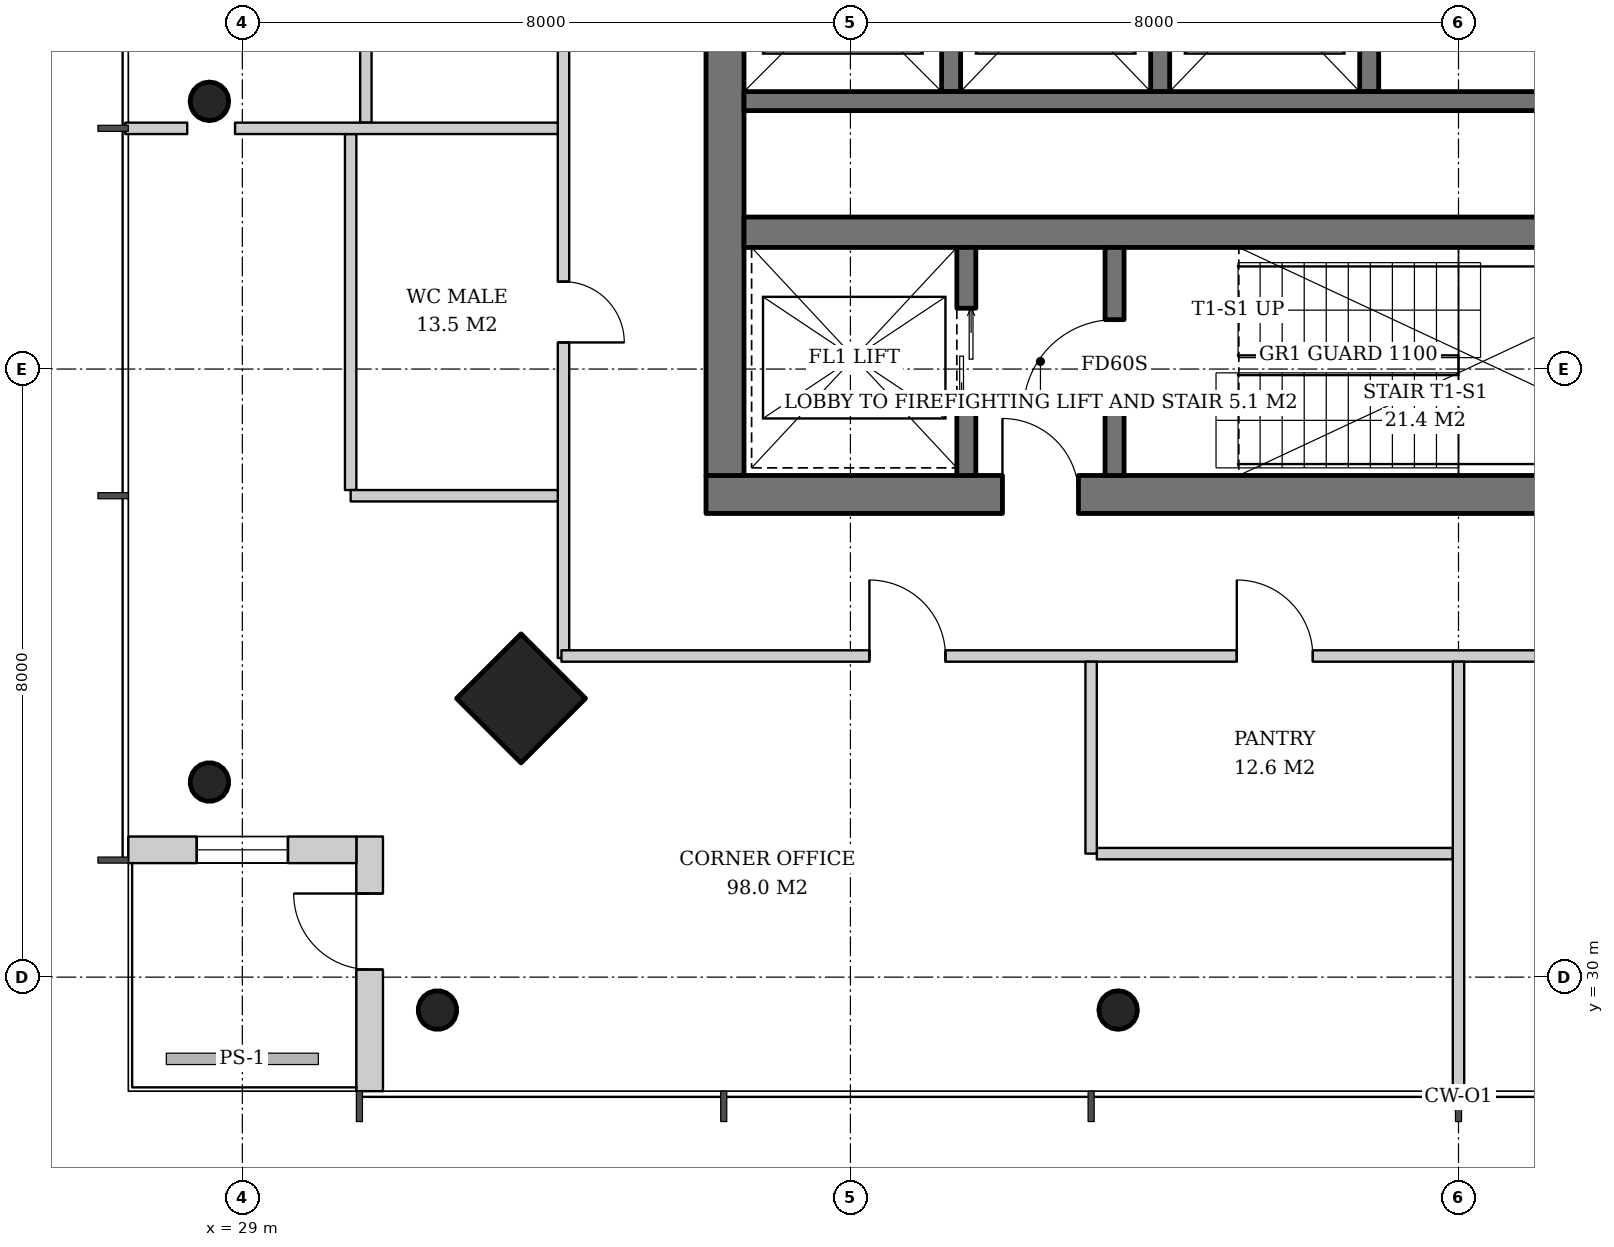
"""IFC4 building model, lengths in metres.
Left out: names, types, materials, properties, quantities, classifications, styles, units other than length and angle.
Written with IfcOpenShell. Run it as: python <this file> out.ifc"""

import sys

from ifc_helpers import new_model, si_unit, direction, frame, frame_2d, origin, origin_2d, place, context, subcontext, project, spatial, rectangle, hollow_circle, extrude, element, fill, save


model = new_model("IFC4")
c1 = context("Model", 3, precision=1e-05, world=origin(), true_north=direction((0.0, 1.0)))
c2 = subcontext(c1, "Body", "Model", "MODEL_VIEW")
j1 = project(units=[si_unit("LENGTHUNIT", "METRE"), si_unit("PLANEANGLEUNIT", "RADIAN")], contexts=[c1])
p1 = place(None, origin())
s1 = spatial("IfcSite", under=j1, at=p1, CompositionType="ELEMENT")
p2 = place(p1, origin())
s2 = spatial("IfcBuilding", under=s1, at=p2, CompositionType="ELEMENT")
p3 = place(p2, frame((0.0, 0.0, 256.6)))
s3 = spatial("IfcBuildingStorey", under=s2, at=p3, CompositionType="ELEMENT", Elevation=256.6)
p4 = place(p3, frame((32.629, 33.629, 0.0), z_axis=(0.031900153262, 0.031900153262, 0.998981861919), x_axis=(-0.707106781187, 0.707106781187, 0.0)))
e1 = element("IfcColumn", 1, at=p4, inside=s3, PredefinedType="COLUMN", context=c2, shape_type="SweptSolid", body=[
    extrude(rectangle(XDim=1.2, YDim=1.2, at=origin_2d()), origin(), (0.0, 0.0, 1.0), 3.804),
])
p5 = place(p3, frame((28.529, 32.529, 0.0), z_axis=(0.031900153262, 0.031900153262, 0.998981861919), x_axis=(-0.707106781187, 0.707106781187, 0.0)))
e2 = element("IfcColumn", 2, at=p5, inside=s3, PredefinedType="COLUMN", context=c2, shape_type="SweptSolid", body=[
    extrude(hollow_circle(Radius=0.254, WallThickness=0.02, at=origin_2d()), origin(), (0.0, 0.0, 1.0), 3.804),
])
p6 = place(p3, frame((28.529, 41.51, 0.0), z_axis=(0.031914583439, 0.010659599298, 0.999433755837), x_axis=(-0.316800238982, 0.948492281772, 0.0)))
e3 = element("IfcColumn", 3, at=p6, inside=s3, PredefinedType="COLUMN", context=c2, shape_type="SweptSolid", body=[
    extrude(hollow_circle(Radius=0.254, WallThickness=0.02, at=origin_2d()), origin(), (0.0, 0.0, 1.0), 3.802),
])
p7 = place(p3, frame((31.529, 29.529, 0.0), z_axis=(0.031900153262, 0.031900153262, 0.998981861919), x_axis=(-0.707106781187, 0.707106781187, 0.0)))
e4 = element("IfcColumn", 4, at=p7, inside=s3, PredefinedType="COLUMN", context=c2, shape_type="SweptSolid", body=[
    extrude(hollow_circle(Radius=0.254, WallThickness=0.02, at=origin_2d()), origin(), (0.0, 0.0, 1.0), 3.804),
])
p8 = place(p3, frame((40.51, 29.529, 0.0), z_axis=(0.010659599298, 0.031914583439, 0.999433755837), x_axis=(-0.948492281772, 0.316800238982, 0.0)))
e5 = element("IfcColumn", 5, at=p8, inside=s3, PredefinedType="COLUMN", context=c2, shape_type="SweptSolid", body=[
    extrude(hollow_circle(Radius=0.254, WallThickness=0.02, at=origin_2d()), origin(), (0.0, 0.0, 1.0), 3.802),
])
p9 = place(p3, frame((35.1, 36.35, 0.0), z_axis=(0.0, 0.0, 1.0), x_axis=(1.0, 0.0, 0.0)))
e6 = element("IfcWall", 6, at=p9, inside=s3, PredefinedType="SHEAR", context=c2, shape_type="SweptSolid", body=[
    extrude(rectangle(XDim=19.8, YDim=0.5, at=frame_2d((9.9, 0.0))), origin(), (0.0, 0.0, 1.0), 3.8),
])
p10 = place(p9, frame((3.9, 0.0, 0.0)))
e7 = element("IfcOpeningElement", 7, at=p10, cuts=e6, PredefinedType="OPENING", context=c2, shape_type="SweptSolid", body=[
    extrude(rectangle(XDim=1.0, YDim=2.1, at=frame_2d((0.5, 1.05))), frame((0.0, 0.26, 0.0), z_axis=(0.0, -1.0, 0.0), x_axis=(1.0, 0.0, 0.0)), (0.0, 0.0, 1.0), 0.52),
])
p11 = place(p9, frame((15.35, 0.0, 0.0)))
e8 = element("IfcOpeningElement", 8, at=p11, cuts=e6, PredefinedType="OPENING", context=c2, shape_type="SweptSolid", body=[
    extrude(rectangle(XDim=1.0, YDim=2.1, at=frame_2d((0.5, 1.05))), frame((0.0, 0.26, 0.0), z_axis=(0.0, -1.0, 0.0), x_axis=(1.0, 0.0, 0.0)), (0.0, 0.0, 1.0), 0.52),
])
p12 = place(p3, frame((35.35, 36.6, 0.0), z_axis=(0.0, 0.0, 1.0), x_axis=(0.0, 1.0, 0.0)))
e9 = element("IfcWall", 9, at=p12, inside=s3, PredefinedType="SHEAR", context=c2, shape_type="SweptSolid", body=[
    extrude(rectangle(XDim=18.8, YDim=0.5, at=frame_2d((9.4, 0.0))), origin(), (0.0, 0.0, 1.0), 3.8),
])
p13 = place(p12, frame((8.5, 0.0, 0.0)))
e10 = element("IfcOpeningElement", 10, at=p13, cuts=e9, PredefinedType="OPENING", context=c2, shape_type="SweptSolid", body=[
    extrude(rectangle(XDim=1.8, YDim=2.4, at=frame_2d((0.9, 1.2))), frame((0.0, 0.26, 0.0), z_axis=(0.0, -1.0, 0.0), x_axis=(1.0, 0.0, 0.0)), (0.0, 0.0, 1.0), 0.52),
])
p14 = place(p3, frame((35.6, 39.8, 0.0), z_axis=(0.0, 0.0, 1.0), x_axis=(1.0, 0.0, 0.0)))
e11 = element("IfcWall", 11, at=p14, inside=s3, PredefinedType="SHEAR", context=c2, shape_type="SweptSolid", body=[
    extrude(rectangle(XDim=18.8, YDim=0.4, at=frame_2d((9.4, 0.0))), origin(), (0.0, 0.0, 1.0), 3.8),
])
p15 = place(p3, frame((30.675, 28.5, 0.0), z_axis=(0.0, 0.0, 1.0), x_axis=(0.0, 1.0, 0.0)))
e12 = element("IfcWall", 12, at=p15, inside=s3, PredefinedType="SOLIDWALL", context=c2, shape_type="SweptSolid", body=[
    extrude(rectangle(XDim=3.35, YDim=0.35, at=frame_2d((1.675, 0.0))), origin(), (0.0, 0.0, 1.0), 3.62),
])
p16 = place(p15, frame((1.6, 0.0, 0.0)))
e13 = element("IfcOpeningElement", 13, at=p16, cuts=e12, PredefinedType="OPENING", context=c2, shape_type="SweptSolid", body=[
    extrude(rectangle(XDim=1.0, YDim=2.4, at=frame_2d((0.5, 1.2))), frame((0.0, 0.185, 0.0), z_axis=(0.0, -1.0, 0.0), x_axis=(1.0, 0.0, 0.0)), (0.0, 0.0, 1.0), 0.37),
])
p17 = place(p3, frame((30.5, 31.675, 0.0), z_axis=(0.0, 0.0, 1.0), x_axis=(-1.0, 0.0, 0.0)))
e14 = element("IfcWall", 14, at=p17, inside=s3, PredefinedType="SOLIDWALL", context=c2, shape_type="SweptSolid", body=[
    extrude(rectangle(XDim=3.0, YDim=0.35, at=frame_2d((1.5, 0.0))), origin(), (0.0, 0.0, 1.0), 3.62),
])
p18 = place(p17, frame((0.9, 0.0, 0.6)))
e15 = element("IfcOpeningElement", 15, at=p18, cuts=e14, PredefinedType="OPENING", context=c2, shape_type="SweptSolid", body=[
    extrude(rectangle(XDim=1.2, YDim=2.55, at=frame_2d((0.6, 1.275))), frame((0.0, 0.185, 0.0), z_axis=(0.0, -1.0, 0.0), x_axis=(1.0, 0.0, 0.0)), (0.0, 0.0, 1.0), 0.37),
])
p19 = place(p3, frame((38.525, 36.6, 0.0), z_axis=(0.0, 0.0, 1.0), x_axis=(0.0, 1.0, 0.0)))
e16 = element("IfcWall", 16, at=p19, inside=s3, PredefinedType="SHEAR", context=c2, shape_type="SweptSolid", body=[
    extrude(rectangle(XDim=3.0, YDim=0.25, at=frame_2d((1.5, 0.0))), origin(), (0.0, 0.0, 1.0), 3.8),
])
p20 = place(p19, frame((0.9, 0.0, 0.0)))
e17 = element("IfcOpeningElement", 17, at=p20, cuts=e16, PredefinedType="OPENING", context=c2, shape_type="SweptSolid", body=[
    extrude(rectangle(XDim=1.3, YDim=2.2, at=frame_2d((0.65, 1.1))), frame((0.0, 0.135, 0.0), z_axis=(0.0, -1.0, 0.0), x_axis=(1.0, 0.0, 0.0)), (0.0, 0.0, 1.0), 0.27),
])
p21 = place(p3, frame((40.475, 36.6, 0.0), z_axis=(0.0, 0.0, 1.0), x_axis=(0.0, 1.0, 0.0)))
e18 = element("IfcWall", 18, at=p21, inside=s3, PredefinedType="SHEAR", context=c2, shape_type="SweptSolid", body=[
    extrude(rectangle(XDim=3.0, YDim=0.25, at=frame_2d((1.5, 0.0))), origin(), (0.0, 0.0, 1.0), 3.8),
])
p22 = place(p21, frame((0.85, 0.0, 0.0)))
e19 = element("IfcOpeningElement", 19, at=p22, cuts=e18, PredefinedType="OPENING", context=c2, shape_type="SweptSolid", body=[
    extrude(rectangle(XDim=1.2, YDim=2.1, at=frame_2d((0.6, 1.05))), frame((0.0, 0.135, 0.0), z_axis=(0.0, -1.0, 0.0), x_axis=(1.0, 0.0, 0.0)), (0.0, 0.0, 1.0), 0.27),
])
for number, where, z_axis, x_axis in (
    (20, (38.325, 44.25, 0.0), (0.0, 0.0, 1.0), (0.0, -1.0, 0.0)),
    (21, (41.075, 44.25, 0.0), (0.0, 0.0, 1.0), (0.0, -1.0, 0.0)),
    (22, (43.825, 44.25, 0.0), (0.0, 0.0, 1.0), (0.0, -1.0, 0.0)),
):
    element("IfcWall", number, at=place(p3, frame(where, z_axis=z_axis, x_axis=x_axis)), inside=s3, PredefinedType="SHEAR", context=c2, shape_type="SweptSolid", body=[
        extrude(rectangle(XDim=2.6, YDim=0.25, at=frame_2d((1.3, 0.0))), origin(), (0.0, 0.0, 1.0), 3.8),
    ])
p23 = place(p3, frame((35.6, 41.525, 0.0), z_axis=(0.0, 0.0, 1.0), x_axis=(1.0, 0.0, 0.0)))
e23 = element("IfcWall", 23, at=p23, inside=s3, PredefinedType="SHEAR", context=c2, shape_type="SweptSolid", body=[
    extrude(rectangle(XDim=11.1, YDim=0.25, at=frame_2d((5.55, 0.0))), origin(), (0.0, 0.0, 1.0), 3.8),
])
p24 = place(p3, frame((30.625, 45.925, 0.0), z_axis=(0.0, 0.0, 1.0), x_axis=(0.0, -1.0, 0.0)))
e24 = element("IfcWall", 24, at=p24, inside=s3, PredefinedType="PARTITIONING", context=c2, shape_type="SweptSolid", body=[
    extrude(rectangle(XDim=4.683, YDim=0.15, at=frame_2d((2.342, 0.0))), origin(), (0.0, 0.0, 1.0), 3.12),
])
p25 = place(p3, frame((30.425, 41.092, 0.0), z_axis=(0.0, 0.0, 1.0), x_axis=(0.0, -1.0, 0.0)))
e25 = element("IfcWall", 25, at=p25, inside=s3, PredefinedType="PARTITIONING", context=c2, shape_type="SweptSolid", body=[
    extrude(rectangle(XDim=4.683, YDim=0.15, at=frame_2d((2.342, 0.0))), origin(), (0.0, 0.0, 1.0), 3.12),
])
p26 = place(p3, frame((33.225, 57.802, 0.0), z_axis=(0.0, 0.0, 1.0), x_axis=(0.0, -1.0, 0.0)))
e26 = element("IfcWall", 26, at=p26, inside=s3, PredefinedType="PARTITIONING", context=c2, shape_type="SweptSolid", body=[
    extrude(rectangle(XDim=23.603, YDim=0.15, at=frame_2d((11.802, 0.0))), origin(), (0.0, 0.0, 1.0), 3.02),
])
p27 = place(p26, frame((4.052, 0.0, 0.0)))
e27 = element("IfcOpeningElement", 27, at=p27, cuts=e26, PredefinedType="OPENING", context=c2, shape_type="SweptSolid", body=[
    extrude(rectangle(XDim=1.0, YDim=2.1, at=frame_2d((0.5, 1.05))), frame((0.0, 0.085, 0.0), z_axis=(0.0, -1.0, 0.0), x_axis=(1.0, 0.0, 0.0)), (0.0, 0.0, 1.0), 0.17),
])
p28 = place(p26, frame((8.985, 0.0, 0.0)))
e28 = element("IfcOpeningElement", 28, at=p28, cuts=e26, PredefinedType="OPENING", context=c2, shape_type="SweptSolid", body=[
    extrude(rectangle(XDim=0.8, YDim=2.1, at=frame_2d((0.4, 1.05))), frame((0.0, 0.085, 0.0), z_axis=(0.0, -1.0, 0.0), x_axis=(1.0, 0.0, 0.0)), (0.0, 0.0, 1.0), 0.17),
])
p29 = place(p26, frame((13.718, 0.0, 0.0)))
e29 = element("IfcOpeningElement", 29, at=p29, cuts=e26, PredefinedType="OPENING", context=c2, shape_type="SweptSolid", body=[
    extrude(rectangle(XDim=1.0, YDim=2.1, at=frame_2d((0.5, 1.05))), frame((0.0, 0.085, 0.0), z_axis=(0.0, -1.0, 0.0), x_axis=(1.0, 0.0, 0.0)), (0.0, 0.0, 1.0), 0.17),
])
p30 = place(p26, frame((18.651, 0.0, 0.0)))
e30 = element("IfcOpeningElement", 30, at=p30, cuts=e26, PredefinedType="OPENING", context=c2, shape_type="SweptSolid", body=[
    extrude(rectangle(XDim=0.8, YDim=2.1, at=frame_2d((0.4, 1.05))), frame((0.0, 0.085, 0.0), z_axis=(0.0, -1.0, 0.0), x_axis=(1.0, 0.0, 0.0)), (0.0, 0.0, 1.0), 0.17),
])
p31 = place(p3, frame((33.15, 41.167, 0.0), z_axis=(0.0, 0.0, 1.0), x_axis=(-1.0, 0.0, 0.0)))
e31 = element("IfcWall", 31, at=p31, inside=s3, PredefinedType="PARTITIONING", context=c2, shape_type="SweptSolid", body=[
    extrude(rectangle(XDim=4.246, YDim=0.15, at=frame_2d((2.123, 0.0))), origin(), (0.0, 0.0, 1.0), 3.62),
])
p32 = place(p3, frame((28.275, 41.167, 0.0), z_axis=(0.0, 0.0, 1.0), x_axis=(-1.0, 0.0, 0.0)))
e32 = element("IfcWall", 32, at=p32, inside=s3, PredefinedType="PARTITIONING", context=c2, shape_type="SweptSolid", body=[
    extrude(rectangle(XDim=0.815, YDim=0.15, at=frame_2d((0.407, 0.0))), origin(), (0.0, 0.0, 1.0), 3.62),
])
p33 = place(p3, frame((33.15, 36.333, 0.0), z_axis=(0.0, 0.0, 1.0), x_axis=(-1.0, 0.0, 0.0)))
e33 = element("IfcWall", 33, at=p33, inside=s3, PredefinedType="PARTITIONING", context=c2, shape_type="SweptSolid", body=[
    extrude(rectangle(XDim=2.725, YDim=0.15, at=frame_2d((1.362, 0.0))), origin(), (0.0, 0.0, 1.0), 3.62),
])
p34 = place(p3, frame((40.242, 31.625, 0.0), z_axis=(0.0, 0.0, 1.0), x_axis=(1.0, 0.0, 0.0)))
e34 = element("IfcWall", 34, at=p34, inside=s3, PredefinedType="PARTITIONING", context=c2, shape_type="SweptSolid", body=[
    extrude(rectangle(XDim=4.683, YDim=0.15, at=frame_2d((2.342, 0.0))), origin(), (0.0, 0.0, 1.0), 3.12),
])
p35 = place(p3, frame((33.198, 34.225, 0.0), z_axis=(0.0, 0.0, 1.0), x_axis=(1.0, 0.0, 0.0)))
e35 = element("IfcWall", 35, at=p35, inside=s3, PredefinedType="PARTITIONING", context=c2, shape_type="SweptSolid", body=[
    extrude(rectangle(XDim=23.603, YDim=0.15, at=frame_2d((11.802, 0.0))), origin(), (0.0, 0.0, 1.0), 3.02),
])
p36 = place(p35, frame((4.052, 0.0, 0.0)))
e36 = element("IfcOpeningElement", 36, at=p36, cuts=e35, PredefinedType="OPENING", context=c2, shape_type="SweptSolid", body=[
    extrude(rectangle(XDim=1.0, YDim=2.1, at=frame_2d((0.5, 1.05))), frame((0.0, 0.085, 0.0), z_axis=(0.0, -1.0, 0.0), x_axis=(1.0, 0.0, 0.0)), (0.0, 0.0, 1.0), 0.17),
])
p37 = place(p35, frame((8.885, 0.0, 0.0)))
e37 = element("IfcOpeningElement", 37, at=p37, cuts=e35, PredefinedType="OPENING", context=c2, shape_type="SweptSolid", body=[
    extrude(rectangle(XDim=1.0, YDim=2.1, at=frame_2d((0.5, 1.05))), frame((0.0, 0.085, 0.0), z_axis=(0.0, -1.0, 0.0), x_axis=(1.0, 0.0, 0.0)), (0.0, 0.0, 1.0), 0.17),
])
p38 = place(p35, frame((13.718, 0.0, 0.0)))
e38 = element("IfcOpeningElement", 38, at=p38, cuts=e35, PredefinedType="OPENING", context=c2, shape_type="SweptSolid", body=[
    extrude(rectangle(XDim=1.0, YDim=2.1, at=frame_2d((0.5, 1.05))), frame((0.0, 0.085, 0.0), z_axis=(0.0, -1.0, 0.0), x_axis=(1.0, 0.0, 0.0)), (0.0, 0.0, 1.0), 0.17),
])
p39 = place(p35, frame((18.552, 0.0, 0.0)))
e39 = element("IfcOpeningElement", 39, at=p39, cuts=e35, PredefinedType="OPENING", context=c2, shape_type="SweptSolid", body=[
    extrude(rectangle(XDim=1.0, YDim=2.1, at=frame_2d((0.5, 1.05))), frame((0.0, 0.085, 0.0), z_axis=(0.0, -1.0, 0.0), x_axis=(1.0, 0.0, 0.0)), (0.0, 0.0, 1.0), 0.17),
])
p40 = place(p3, frame((40.167, 34.15, 0.0), z_axis=(0.0, 0.0, 1.0), x_axis=(0.0, -1.0, 0.0)))
e40 = element("IfcWall", 40, at=p40, inside=s3, PredefinedType="PARTITIONING", context=c2, shape_type="SweptSolid", body=[
    extrude(rectangle(XDim=2.525, YDim=0.15, at=frame_2d((1.262, 0.0))), origin(), (0.0, 0.0, 1.0), 3.62),
])
p41 = place(p3, frame((45.0, 34.15, 0.0), z_axis=(0.0, 0.0, 1.0), x_axis=(0.0, -1.0, 0.0)))
e41 = element("IfcWall", 41, at=p41, inside=s3, PredefinedType="PARTITIONING", context=c2, shape_type="SweptSolid", body=[
    extrude(rectangle(XDim=5.69, YDim=0.15, at=frame_2d((2.845, 0.0))), origin(), (0.0, 0.0, 1.0), 3.12),
])
p42 = place(p16, origin())
e42 = element("IfcDoor", 42, at=p42, inside=s3, OperationType="SINGLE_SWING_RIGHT", PredefinedType="DOOR", context=c2, shape_type="SweptSolid", body=[
    extrude(rectangle(XDim=1.0, YDim=2.4, at=frame_2d((0.5, 1.2))), frame((0.0, 0.025, 0.0), z_axis=(0.0, -1.0, 0.0), x_axis=(1.0, 0.0, 0.0)), (0.0, 0.0, 1.0), 0.05),
])
fill(e13, e42)
p43 = place(p18, origin())
e43 = element("IfcWindow", 43, at=p43, inside=s3, PartitioningType="SINGLE_PANEL", PredefinedType="WINDOW", context=c2, shape_type="SweptSolid", body=[
    extrude(rectangle(XDim=1.2, YDim=2.55, at=frame_2d((0.6, 1.275))), frame((0.0, 0.03, 0.0), z_axis=(0.0, -1.0, 0.0), x_axis=(1.0, 0.0, 0.0)), (0.0, 0.0, 1.0), 0.06),
])
fill(e15, e43)
p44 = place(p20, origin())
e44 = element("IfcDoor", 44, at=p44, inside=s3, OperationType="DOUBLE_DOOR_SLIDING", PredefinedType="DOOR", context=c2, shape_type="SweptSolid", body=[
    extrude(rectangle(XDim=1.3, YDim=2.2, at=frame_2d((0.65, 1.1))), frame((0.0, 0.025, 0.0), z_axis=(0.0, -1.0, 0.0), x_axis=(1.0, 0.0, 0.0)), (0.0, 0.0, 1.0), 0.05),
])
fill(e17, e44)
p45 = place(p22, origin())
e45 = element("IfcDoor", 45, at=p45, inside=s3, OperationType="SINGLE_SWING_LEFT", PredefinedType="DOOR", context=c2, shape_type="SweptSolid", body=[
    extrude(rectangle(XDim=1.2, YDim=2.1, at=frame_2d((0.6, 1.05))), frame((0.0, 0.025, 0.0), z_axis=(0.0, -1.0, 0.0), x_axis=(1.0, 0.0, 0.0)), (0.0, 0.0, 1.0), 0.05),
])
fill(e19, e45)
p46 = place(p10, origin())
e46 = element("IfcDoor", 46, at=p46, inside=s3, OperationType="SINGLE_SWING_LEFT", PredefinedType="DOOR", context=c2, shape_type="SweptSolid", body=[
    extrude(rectangle(XDim=1.0, YDim=2.1, at=frame_2d((0.5, 1.05))), frame((0.0, 0.025, 0.0), z_axis=(0.0, -1.0, 0.0), x_axis=(1.0, 0.0, 0.0)), (0.0, 0.0, 1.0), 0.05),
])
fill(e7, e46)
p47 = place(p30, origin())
e47 = element("IfcDoor", 47, at=p47, inside=s3, OperationType="SINGLE_SWING_RIGHT", PredefinedType="DOOR", context=c2, shape_type="SweptSolid", body=[
    extrude(rectangle(XDim=0.8, YDim=2.1, at=frame_2d((0.4, 1.05))), frame((0.0, 0.025, 0.0), z_axis=(0.0, -1.0, 0.0), x_axis=(1.0, 0.0, 0.0)), (0.0, 0.0, 1.0), 0.05),
])
fill(e30, e47)
p48 = place(p36, origin())
e48 = element("IfcDoor", 48, at=p48, inside=s3, OperationType="SINGLE_SWING_LEFT", PredefinedType="DOOR", context=c2, shape_type="SweptSolid", body=[
    extrude(rectangle(XDim=1.0, YDim=2.1, at=frame_2d((0.5, 1.05))), frame((0.0, 0.025, 0.0), z_axis=(0.0, -1.0, 0.0), x_axis=(1.0, 0.0, 0.0)), (0.0, 0.0, 1.0), 0.05),
])
fill(e36, e48)
p49 = place(p37, origin())
e49 = element("IfcDoor", 49, at=p49, inside=s3, OperationType="SINGLE_SWING_LEFT", PredefinedType="DOOR", context=c2, shape_type="SweptSolid", body=[
    extrude(rectangle(XDim=1.0, YDim=2.1, at=frame_2d((0.5, 1.05))), frame((0.0, 0.025, 0.0), z_axis=(0.0, -1.0, 0.0), x_axis=(1.0, 0.0, 0.0)), (0.0, 0.0, 1.0), 0.05),
])
fill(e37, e49)
save(model, sys.argv[1])
